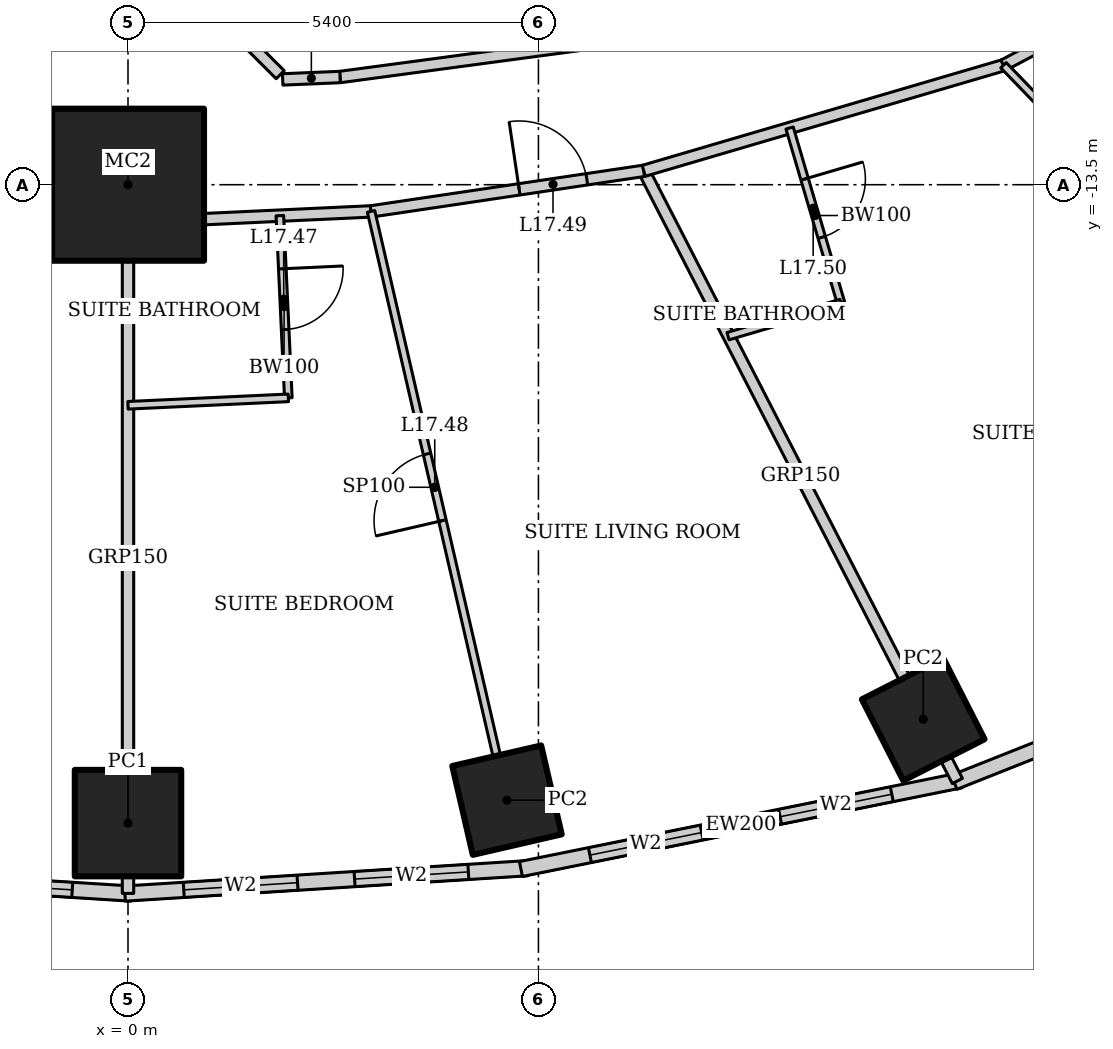
"""IFC4 building model, lengths in metres.
Left out: names, types, materials, properties, quantities, classifications, styles, units other than length and angle.
Written with IfcOpenShell. Run it as: python <this file> out.ifc"""

import sys

from ifc_helpers import new_model, si_unit, direction, frame, frame_2d, origin, origin_2d, place, context, subcontext, project, spatial, rectangle, hollow_rectangle, extrude, element, fill, save


model = new_model("IFC4")
c1 = context("Model", 3, precision=1e-05, world=origin(), true_north=direction((0.0, 1.0)))
c2 = subcontext(c1, "Body", "Model", "MODEL_VIEW")
j1 = project(units=[si_unit("LENGTHUNIT", "METRE"), si_unit("PLANEANGLEUNIT", "RADIAN")], contexts=[c1])
p1 = place(None, origin())
s1 = spatial("IfcSite", under=j1, at=p1, CompositionType="ELEMENT")
p2 = place(p1, origin())
s2 = spatial("IfcBuilding", under=s1, at=p2, CompositionType="ELEMENT")
p3 = place(p2, frame((0.0, 0.0, 76.6)))
s3 = spatial("IfcBuildingStorey", under=s2, at=p3, CompositionType="ELEMENT", Elevation=76.6)
p4 = place(p3, frame((0.0, -13.5, 0.0), z_axis=(0.0, 0.0, 1.0), x_axis=(1.0, 0.0, 0.0)))
e1 = element("IfcColumn", 1, at=p4, inside=s3, PredefinedType="COLUMN", context=c2, shape_type="SweptSolid", body=[
    extrude(hollow_rectangle(XDim=2.0, YDim=2.0, WallThickness=0.17, at=origin_2d()), origin(), (0.0, 0.0, 1.0), 3.6),
])
p5 = place(p3, frame((0.0, -21.9, 0.0), z_axis=(0.0, 0.0, 1.0), x_axis=(1.0, 0.0, 0.0)))
e2 = element("IfcColumn", 2, at=p5, inside=s3, PredefinedType="COLUMN", context=c2, shape_type="SweptSolid", body=[
    extrude(hollow_rectangle(XDim=1.4, YDim=1.4, WallThickness=0.1, at=origin_2d()), origin(), (0.0, 0.0, 1.0), 3.6),
])
for number, where, z_axis, x_axis in (
    (3, (4.986, -21.598, 0.0), (0.0, 0.0, 1.0), (0.974, 0.225, 0.0)),
    (4, (10.463, -20.534, 0.0), (0.0, 0.0, 1.0), (0.891, 0.454, 0.0)),
):
    element("IfcColumn", number, at=place(p3, frame(where, z_axis=z_axis, x_axis=x_axis)), inside=s3, PredefinedType="COLUMN", context=c2, shape_type="SweptSolid", body=[
        extrude(hollow_rectangle(XDim=1.2, YDim=1.2, WallThickness=0.1, at=origin_2d()), origin(), (0.0, 0.0, 1.0), 3.6),
    ])
p6 = place(p3, frame((-5.253, -22.493, 0.0), z_axis=(0.0, 0.0, 1.0), x_axis=(0.998018582375, -0.062919863585, 0.0)))
e5 = element("IfcWall", 5, at=p6, inside=s3, PredefinedType="SOLIDWALL", context=c2, shape_type="SweptSolid", body=[
    extrude(rectangle(XDim=5.304, YDim=0.2, at=frame_2d((2.652, 0.0))), origin(), (0.0, 0.0, 1.0), 3.45),
])
p7 = place(p6, frame((0.776, 0.0, 0.5)))
e6 = element("IfcOpeningElement", 6, at=p7, cuts=e5, PredefinedType="OPENING", context=c2, shape_type="SweptSolid", body=[
    extrude(rectangle(XDim=1.5, YDim=2.2, at=frame_2d((0.75, 1.1))), frame((0.0, 0.11, 0.0), z_axis=(0.0, -1.0, 0.0), x_axis=(1.0, 0.0, 0.0)), (0.0, 0.0, 1.0), 0.22),
])
p8 = place(p6, frame((3.028, 0.0, 0.5)))
e7 = element("IfcOpeningElement", 7, at=p8, cuts=e5, PredefinedType="OPENING", context=c2, shape_type="SweptSolid", body=[
    extrude(rectangle(XDim=1.5, YDim=2.2, at=frame_2d((0.75, 1.1))), frame((0.0, 0.11, 0.0), z_axis=(0.0, -1.0, 0.0), x_axis=(1.0, 0.0, 0.0)), (0.0, 0.0, 1.0), 0.22),
])
p9 = place(p3, frame((-0.041, -22.827, 0.0), z_axis=(0.0, 0.0, 1.0), x_axis=(0.998018582375, 0.062919863585, 0.0)))
e8 = element("IfcWall", 8, at=p9, inside=s3, PredefinedType="SOLIDWALL", context=c2, shape_type="SweptSolid", body=[
    extrude(rectangle(XDim=5.304, YDim=0.2, at=frame_2d((2.652, 0.0))), origin(), (0.0, 0.0, 1.0), 3.45),
])
p10 = place(p9, frame((0.776, 0.0, 0.5)))
e9 = element("IfcOpeningElement", 9, at=p10, cuts=e8, PredefinedType="OPENING", context=c2, shape_type="SweptSolid", body=[
    extrude(rectangle(XDim=1.5, YDim=2.2, at=frame_2d((0.75, 1.1))), frame((0.0, 0.11, 0.0), z_axis=(0.0, -1.0, 0.0), x_axis=(1.0, 0.0, 0.0)), (0.0, 0.0, 1.0), 0.22),
])
p11 = place(p9, frame((3.028, 0.0, 0.5)))
e10 = element("IfcOpeningElement", 10, at=p11, cuts=e8, PredefinedType="OPENING", context=c2, shape_type="SweptSolid", body=[
    extrude(rectangle(XDim=1.5, YDim=2.2, at=frame_2d((0.75, 1.1))), frame((0.0, 0.11, 0.0), z_axis=(0.0, -1.0, 0.0), x_axis=(1.0, 0.0, 0.0)), (0.0, 0.0, 1.0), 0.22),
])
p12 = place(p3, frame((5.17, -22.504, 0.0), z_axis=(0.0, 0.0, 1.0), x_axis=(0.980251657452, 0.197754110105, 0.0)))
e11 = element("IfcWall", 11, at=p12, inside=s3, PredefinedType="SOLIDWALL", context=c2, shape_type="SweptSolid", body=[
    extrude(rectangle(XDim=5.904, YDim=0.2, at=frame_2d((2.952, 0.0))), origin(), (0.0, 0.0, 1.0), 3.45),
])
p13 = place(p12, frame((0.926, 0.0, 0.5)))
e12 = element("IfcOpeningElement", 12, at=p13, cuts=e11, PredefinedType="OPENING", context=c2, shape_type="SweptSolid", body=[
    extrude(rectangle(XDim=1.5, YDim=2.2, at=frame_2d((0.75, 1.1))), frame((0.0, 0.11, 0.0), z_axis=(0.0, -1.0, 0.0), x_axis=(1.0, 0.0, 0.0)), (0.0, 0.0, 1.0), 0.22),
])
p14 = place(p12, frame((3.478, 0.0, 0.5)))
e13 = element("IfcOpeningElement", 13, at=p14, cuts=e11, PredefinedType="OPENING", context=c2, shape_type="SweptSolid", body=[
    extrude(rectangle(XDim=1.5, YDim=2.2, at=frame_2d((0.75, 1.1))), frame((0.0, 0.11, 0.0), z_axis=(0.0, -1.0, 0.0), x_axis=(1.0, 0.0, 0.0)), (0.0, 0.0, 1.0), 0.22),
])
p15 = place(p3, frame((10.869, -21.363, 0.0), z_axis=(0.0, 0.0, 1.0), x_axis=(0.929358351251, 0.369178892895, 0.0)))
e14 = element("IfcWall", 14, at=p15, inside=s3, PredefinedType="SOLIDWALL", context=c2, shape_type="SweptSolid", body=[
    extrude(rectangle(XDim=7.692, YDim=0.2, at=frame_2d((3.846, 0.0))), origin(), (0.0, 0.0, 1.0), 3.45),
])
p16 = place(p15, frame((1.373, 0.0, 0.5)))
e15 = element("IfcOpeningElement", 15, at=p16, cuts=e14, PredefinedType="OPENING", context=c2, shape_type="SweptSolid", body=[
    extrude(rectangle(XDim=1.5, YDim=2.2, at=frame_2d((0.75, 1.1))), frame((0.0, 0.11, 0.0), z_axis=(0.0, -1.0, 0.0), x_axis=(1.0, 0.0, 0.0)), (0.0, 0.0, 1.0), 0.22),
])
p17 = place(p15, frame((4.819, 0.0, 0.5)))
e16 = element("IfcOpeningElement", 16, at=p17, cuts=e14, PredefinedType="OPENING", context=c2, shape_type="SweptSolid", body=[
    extrude(rectangle(XDim=1.5, YDim=2.2, at=frame_2d((0.75, 1.1))), frame((0.0, 0.11, 0.0), z_axis=(0.0, -1.0, 0.0), x_axis=(1.0, 0.0, 0.0)), (0.0, 0.0, 1.0), 0.22),
])
p18 = place(p3, frame((0.0, -22.825, 0.0), z_axis=(0.0, 0.0, 1.0), x_axis=(0.0, 1.0, 0.0)))
e17 = element("IfcWall", 17, at=p18, inside=s3, PredefinedType="PARTITIONING", context=c2, shape_type="SweptSolid", body=[
    extrude(rectangle(XDim=8.825, YDim=0.15, at=frame_2d((4.412, 0.0))), origin(), (0.0, 0.0, 1.0), 2.924),
])
p19 = place(p3, frame((10.912, -21.346, 0.0), z_axis=(0.0, 0.0, 1.0), x_axis=(-0.457117602022, 0.889406261458, 0.0)))
e18 = element("IfcWall", 18, at=p19, inside=s3, PredefinedType="PARTITIONING", context=c2, shape_type="SweptSolid", body=[
    extrude(rectangle(XDim=9.027, YDim=0.15, at=frame_2d((4.513, 0.0))), origin(), (0.0, 0.0, 1.0), 2.528),
])
p20 = place(p3, frame((-3.198, -13.851, 0.0), z_axis=(0.0, 0.0, 1.0), x_axis=(0.998920826789, -0.046445471333, 0.0)))
e19 = element("IfcWall", 19, at=p20, inside=s3, PredefinedType="PARTITIONING", context=c2, shape_type="SweptSolid", body=[
    extrude(rectangle(XDim=3.201, YDim=0.15, at=frame_2d((1.601, 0.0))), origin(), (0.0, 0.0, 1.0), 3.45),
])
p21 = place(p20, frame((0.15, 0.0, 0.0)))
e20 = element("IfcOpeningElement", 20, at=p21, cuts=e19, PredefinedType="OPENING", context=c2, shape_type="SweptSolid", body=[
    extrude(rectangle(XDim=0.9, YDim=2.1, at=frame_2d((0.45, 1.05))), frame((0.0, 0.085, 0.0), z_axis=(0.0, -1.0, 0.0), x_axis=(1.0, 0.0, 0.0)), (0.0, 0.0, 1.0), 0.17),
])
p22 = place(p3, frame((0.0, -14.0, 0.0), z_axis=(0.0, 0.0, 1.0), x_axis=(0.998920826789, 0.046445471333, 0.0)))
e21 = element("IfcWall", 21, at=p22, inside=s3, PredefinedType="PARTITIONING", context=c2, shape_type="SweptSolid", body=[
    extrude(rectangle(XDim=3.201, YDim=0.15, at=frame_2d((1.601, 0.0))), origin(), (0.0, 0.0, 1.0), 3.45),
])
p23 = place(p3, frame((3.198, -13.851, 0.0), z_axis=(0.0, 0.0, 1.0), x_axis=(0.989107488999, 0.14719502439, 0.0)))
e22 = element("IfcWall", 22, at=p23, inside=s3, PredefinedType="PARTITIONING", context=c2, shape_type="SweptSolid", body=[
    extrude(rectangle(XDim=3.627, YDim=0.15, at=frame_2d((1.814, 0.0))), origin(), (0.0, 0.0, 1.0), 3.45),
])
p24 = place(p23, frame((1.97, 0.0, 0.0)))
e23 = element("IfcOpeningElement", 23, at=p24, cuts=e22, PredefinedType="OPENING", context=c2, shape_type="SweptSolid", body=[
    extrude(rectangle(XDim=0.9, YDim=2.1, at=frame_2d((0.45, 1.05))), frame((0.0, 0.085, 0.0), z_axis=(0.0, -1.0, 0.0), x_axis=(1.0, 0.0, 0.0)), (0.0, 0.0, 1.0), 0.17),
])
p25 = place(p3, frame((6.786, -13.317, 0.0), z_axis=(0.0, 0.0, 1.0), x_axis=(0.959496227294, 0.281721475589, 0.0)))
e24 = element("IfcWall", 24, at=p25, inside=s3, PredefinedType="PARTITIONING", context=c2, shape_type="SweptSolid", body=[
    extrude(rectangle(XDim=4.933, YDim=0.15, at=frame_2d((2.466, 0.0))), origin(), (0.0, 0.0, 1.0), 3.45),
])
p26 = place(p3, frame((11.519, -11.928, 0.0), z_axis=(0.0, 0.0, 1.0), x_axis=(0.883334368785, 0.468743419071, 0.0)))
e25 = element("IfcWall", 25, at=p26, inside=s3, PredefinedType="PARTITIONING", context=c2, shape_type="SweptSolid", body=[
    extrude(rectangle(XDim=5.491, YDim=0.15, at=frame_2d((2.746, 0.0))), origin(), (0.0, 0.0, 1.0), 3.45),
])
p27 = place(p3, frame((2.79, -12.083, 0.0), z_axis=(0.0, 0.0, 1.0), x_axis=(0.991129053928, 0.13290296633, 0.0)))
e26 = element("IfcWall", 26, at=p27, inside=s3, PredefinedType="PARTITIONING", context=c2, shape_type="SweptSolid", body=[
    extrude(rectangle(XDim=3.18, YDim=0.15, at=frame_2d((1.59, 0.0))), origin(), (0.0, 0.0, 1.0), 3.45),
])
p28 = place(p3, frame((1.998, -13.907, 0.0), z_axis=(0.0, 0.0, 1.0), x_axis=(0.046492089498, -0.998918658157, 0.0)))
e27 = element("IfcWall", 27, at=p28, inside=s3, PredefinedType="PARTITIONING", context=c2, shape_type="SweptSolid", body=[
    extrude(rectangle(XDim=2.4, YDim=0.1, at=frame_2d((1.2, 0.0))), origin(), (0.0, 0.0, 1.0), 2.749),
])
p29 = place(p28, frame((0.7, 0.0, 0.0)))
e28 = element("IfcOpeningElement", 28, at=p29, cuts=e27, PredefinedType="OPENING", context=c2, shape_type="SweptSolid", body=[
    extrude(rectangle(XDim=0.8, YDim=2.1, at=frame_2d((0.4, 1.05))), frame((0.0, 0.06, 0.0), z_axis=(0.0, -1.0, 0.0), x_axis=(1.0, 0.0, 0.0)), (0.0, 0.0, 1.0), 0.12),
])
p30 = place(p3, frame((2.109, -16.304, 0.0), z_axis=(0.0, 0.0, 1.0), x_axis=(-0.998919337223, -0.04647749694, 0.0)))
e29 = element("IfcWall", 29, at=p30, inside=s3, PredefinedType="PARTITIONING", context=c2, shape_type="SweptSolid", body=[
    extrude(rectangle(XDim=2.112, YDim=0.1, at=frame_2d((1.056, 0.0))), origin(), (0.0, 0.0, 1.0), 3.45),
])
p31 = place(p3, frame((4.874, -21.111, 0.0), z_axis=(0.0, 0.0, 1.0), x_axis=(-0.224955233595, 0.97436909992, 0.0)))
e30 = element("IfcWall", 30, at=p31, inside=s3, PredefinedType="PARTITIONING", context=c2, shape_type="SweptSolid", body=[
    extrude(rectangle(XDim=7.45, YDim=0.1, at=frame_2d((3.725, 0.0))), origin(), (0.0, 0.0, 1.0), 2.767),
])
p32 = place(p31, frame((3.275, 0.0, 0.0)))
e31 = element("IfcOpeningElement", 31, at=p32, cuts=e30, PredefinedType="OPENING", context=c2, shape_type="SweptSolid", body=[
    extrude(rectangle(XDim=0.9, YDim=2.1, at=frame_2d((0.45, 1.05))), frame((0.0, 0.06, 0.0), z_axis=(0.0, -1.0, 0.0), x_axis=(1.0, 0.0, 0.0)), (0.0, 0.0, 1.0), 0.12),
])
p33 = place(p3, frame((8.705, -12.754, 0.0), z_axis=(0.0, 0.0, 1.0), x_axis=(0.281659633817, -0.959514382736, 0.0)))
e32 = element("IfcWall", 32, at=p33, inside=s3, PredefinedType="PARTITIONING", context=c2, shape_type="SweptSolid", body=[
    extrude(rectangle(XDim=2.4, YDim=0.1, at=frame_2d((1.2, 0.0))), origin(), (0.0, 0.0, 1.0), 3.45),
])
p34 = place(p33, frame((0.7, 0.0, 0.0)))
e33 = element("IfcOpeningElement", 33, at=p34, cuts=e32, PredefinedType="OPENING", context=c2, shape_type="SweptSolid", body=[
    extrude(rectangle(XDim=0.8, YDim=2.1, at=frame_2d((0.4, 1.05))), frame((0.0, 0.06, 0.0), z_axis=(0.0, -1.0, 0.0), x_axis=(1.0, 0.0, 0.0)), (0.0, 0.0, 1.0), 0.12),
])
p35 = place(p3, frame((9.381, -15.057, 0.0), z_axis=(0.0, 0.0, 1.0), x_axis=(-0.959518451093, -0.281645773999, 0.0)))
e34 = element("IfcWall", 34, at=p35, inside=s3, PredefinedType="PARTITIONING", context=c2, shape_type="SweptSolid", body=[
    extrude(rectangle(XDim=1.549, YDim=0.1, at=frame_2d((0.774, 0.0))), origin(), (0.0, 0.0, 1.0), 3.45),
])
p36 = place(p3, frame((16.944, -17.545, 0.0), z_axis=(0.0, 0.0, 1.0), x_axis=(-0.694666479492, 0.719331969448, 0.0)))
e35 = element("IfcWall", 35, at=p36, inside=s3, PredefinedType="PARTITIONING", context=c2, shape_type="SweptSolid", body=[
    extrude(rectangle(XDim=7.81, YDim=0.1, at=frame_2d((3.905, 0.0))), origin(), (0.0, 0.0, 1.0), 2.528),
])
p37 = place(p36, frame((3.455, 0.0, 0.0)))
e36 = element("IfcOpeningElement", 36, at=p37, cuts=e35, PredefinedType="OPENING", context=c2, shape_type="SweptSolid", body=[
    extrude(rectangle(XDim=0.9, YDim=2.1, at=frame_2d((0.45, 1.05))), frame((0.0, 0.06, 0.0), z_axis=(0.0, -1.0, 0.0), x_axis=(1.0, 0.0, 0.0)), (0.0, 0.0, 1.0), 0.12),
])
p38 = place(p3, frame((2.035, -12.115, 0.0), z_axis=(0.0, 0.0, 1.0), x_axis=(0.999116751279, 0.042020439232, 0.0)))
e37 = element("IfcWall", 37, at=p38, inside=s3, PredefinedType="PARTITIONING", context=c2, shape_type="SweptSolid", body=[
    extrude(rectangle(XDim=0.755, YDim=0.15, at=frame_2d((0.378, 0.0))), origin(), (0.0, 0.0, 1.0), 3.45),
])
p39 = place(p3, frame((1.425, -11.475, 0.0), z_axis=(0.0, 0.0, 1.0), x_axis=(0.707256164678, -0.706957366129, 0.0)))
e38 = element("IfcWall", 38, at=p39, inside=s3, PredefinedType="PARTITIONING", context=c2, shape_type="SweptSolid", body=[
    extrude(rectangle(XDim=0.817, YDim=0.15, at=frame_2d((0.409, 0.0))), origin(), (0.0, 0.0, 1.0), 3.45),
])
p40 = place(p8, origin())
e39 = element("IfcWindow", 39, at=p40, inside=s3, PartitioningType="SINGLE_PANEL", PredefinedType="WINDOW", context=c2, shape_type="SweptSolid", body=[
    extrude(rectangle(XDim=1.5, YDim=2.2, at=frame_2d((0.75, 1.1))), frame((0.0, 0.03, 0.0), z_axis=(0.0, -1.0, 0.0), x_axis=(1.0, 0.0, 0.0)), (0.0, 0.0, 1.0), 0.06),
])
fill(e7, e39)
p41 = place(p10, origin())
e40 = element("IfcWindow", 40, at=p41, inside=s3, PartitioningType="SINGLE_PANEL", PredefinedType="WINDOW", context=c2, shape_type="SweptSolid", body=[
    extrude(rectangle(XDim=1.5, YDim=2.2, at=frame_2d((0.75, 1.1))), frame((0.0, 0.03, 0.0), z_axis=(0.0, -1.0, 0.0), x_axis=(1.0, 0.0, 0.0)), (0.0, 0.0, 1.0), 0.06),
])
fill(e9, e40)
p42 = place(p11, origin())
e41 = element("IfcWindow", 41, at=p42, inside=s3, PartitioningType="SINGLE_PANEL", PredefinedType="WINDOW", context=c2, shape_type="SweptSolid", body=[
    extrude(rectangle(XDim=1.5, YDim=2.2, at=frame_2d((0.75, 1.1))), frame((0.0, 0.03, 0.0), z_axis=(0.0, -1.0, 0.0), x_axis=(1.0, 0.0, 0.0)), (0.0, 0.0, 1.0), 0.06),
])
fill(e10, e41)
p43 = place(p13, origin())
e42 = element("IfcWindow", 42, at=p43, inside=s3, PartitioningType="SINGLE_PANEL", PredefinedType="WINDOW", context=c2, shape_type="SweptSolid", body=[
    extrude(rectangle(XDim=1.5, YDim=2.2, at=frame_2d((0.75, 1.1))), frame((0.0, 0.03, 0.0), z_axis=(0.0, -1.0, 0.0), x_axis=(1.0, 0.0, 0.0)), (0.0, 0.0, 1.0), 0.06),
])
fill(e12, e42)
p44 = place(p14, origin())
e43 = element("IfcWindow", 43, at=p44, inside=s3, PartitioningType="SINGLE_PANEL", PredefinedType="WINDOW", context=c2, shape_type="SweptSolid", body=[
    extrude(rectangle(XDim=1.5, YDim=2.2, at=frame_2d((0.75, 1.1))), frame((0.0, 0.03, 0.0), z_axis=(0.0, -1.0, 0.0), x_axis=(1.0, 0.0, 0.0)), (0.0, 0.0, 1.0), 0.06),
])
fill(e13, e43)
p45 = place(p29, origin())
e44 = element("IfcDoor", 44, at=p45, inside=s3, OperationType="SINGLE_SWING_LEFT", PredefinedType="DOOR", context=c2, shape_type="SweptSolid", body=[
    extrude(rectangle(XDim=0.8, YDim=2.1, at=frame_2d((0.4, 1.05))), frame((0.0, 0.025, 0.0), z_axis=(0.0, -1.0, 0.0), x_axis=(1.0, 0.0, 0.0)), (0.0, 0.0, 1.0), 0.05),
])
fill(e28, e44)
p46 = place(p32, origin())
e45 = element("IfcDoor", 45, at=p46, inside=s3, OperationType="SINGLE_SWING_LEFT", PredefinedType="DOOR", context=c2, shape_type="SweptSolid", body=[
    extrude(rectangle(XDim=0.9, YDim=2.1, at=frame_2d((0.45, 1.05))), frame((0.0, 0.025, 0.0), z_axis=(0.0, -1.0, 0.0), x_axis=(1.0, 0.0, 0.0)), (0.0, 0.0, 1.0), 0.05),
])
fill(e31, e45)
p47 = place(p24, origin())
e46 = element("IfcDoor", 46, at=p47, inside=s3, OperationType="SINGLE_SWING_LEFT", PredefinedType="DOOR", context=c2, shape_type="SweptSolid", body=[
    extrude(rectangle(XDim=0.9, YDim=2.1, at=frame_2d((0.45, 1.05))), frame((0.0, 0.025, 0.0), z_axis=(0.0, -1.0, 0.0), x_axis=(1.0, 0.0, 0.0)), (0.0, 0.0, 1.0), 0.05),
])
fill(e23, e46)
p48 = place(p34, origin())
e47 = element("IfcDoor", 47, at=p48, inside=s3, OperationType="SINGLE_SWING_LEFT", PredefinedType="DOOR", context=c2, shape_type="SweptSolid", body=[
    extrude(rectangle(XDim=0.8, YDim=2.1, at=frame_2d((0.4, 1.05))), frame((0.0, 0.025, 0.0), z_axis=(0.0, -1.0, 0.0), x_axis=(1.0, 0.0, 0.0)), (0.0, 0.0, 1.0), 0.05),
])
fill(e33, e47)
save(model, sys.argv[1])
